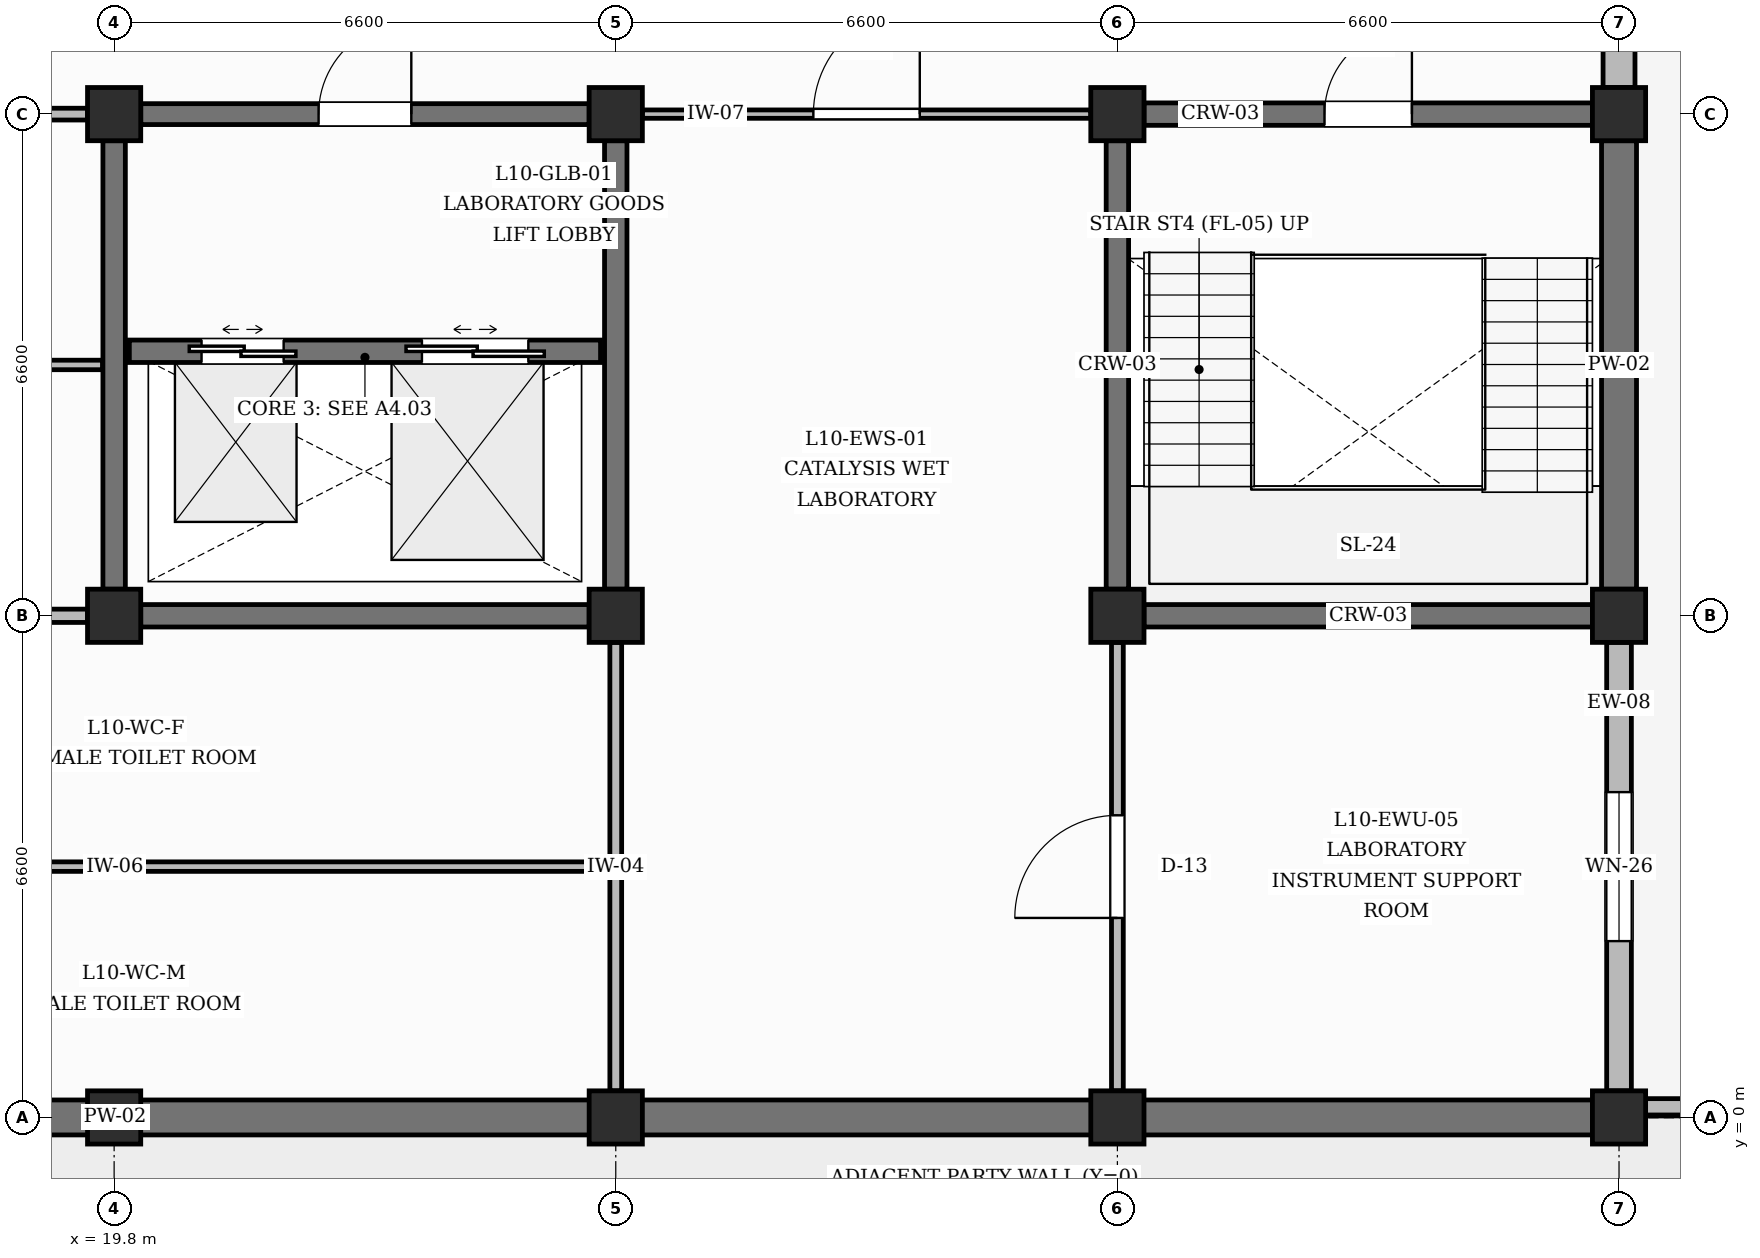
"""IFC4 building model, lengths in metres.
Left out: names, types, materials, properties, quantities, classifications, styles, units other than length and angle.
Written with IfcOpenShell. Run it as: python <this file> out.ifc"""

import sys

from ifc_helpers import new_model, si_unit, direction, frame, frame_2d, origin, origin_2d, place, context, subcontext, project, spatial, rectangle, extrude, element, fill, save


model = new_model("IFC4")
c1 = context("Model", 3, precision=1e-05, world=origin(), true_north=direction((0.0, 1.0)))
c2 = subcontext(c1, "Body", "Model", "MODEL_VIEW")
j1 = project(units=[si_unit("LENGTHUNIT", "METRE"), si_unit("PLANEANGLEUNIT", "RADIAN")], contexts=[c1])
p1 = place(None, origin())
s1 = spatial("IfcSite", under=j1, at=p1, CompositionType="ELEMENT")
p2 = place(p1, origin())
s2 = spatial("IfcBuilding", under=s1, at=p2, CompositionType="ELEMENT")
p3 = place(p2, frame((0.0, 0.0, 43.8)))
s3 = spatial("IfcBuildingStorey", under=s2, at=p3, CompositionType="ELEMENT", Elevation=43.8)
for number, where, z_axis, x_axis in (
    (1, (19.8, 0.0, 0.0), (0.0, 0.0, 1.0), (1.0, 0.0, 0.0)),
    (2, (19.8, 6.6, 0.0), (0.0, 0.0, 1.0), (1.0, 0.0, 0.0)),
    (3, (19.8, 13.2, 0.0), (0.0, 0.0, 1.0), (1.0, 0.0, 0.0)),
    (4, (26.4, 0.0, 0.0), (0.0, 0.0, 1.0), (1.0, 0.0, 0.0)),
    (5, (26.4, 6.6, 0.0), (0.0, 0.0, 1.0), (1.0, 0.0, 0.0)),
    (6, (26.4, 13.2, 0.0), (0.0, 0.0, 1.0), (1.0, 0.0, 0.0)),
    (7, (33.0, 0.0, 0.0), (0.0, 0.0, 1.0), (1.0, 0.0, 0.0)),
    (8, (33.0, 6.6, 0.0), (0.0, 0.0, 1.0), (1.0, 0.0, 0.0)),
    (9, (33.0, 13.2, 0.0), (0.0, 0.0, 1.0), (1.0, 0.0, 0.0)),
    (10, (39.6, 0.0, 0.0), (0.0, 0.0, 1.0), (1.0, 0.0, 0.0)),
    (11, (39.6, 6.6, 0.0), (0.0, 0.0, 1.0), (1.0, 0.0, 0.0)),
    (12, (39.6, 13.2, 0.0), (0.0, 0.0, 1.0), (1.0, 0.0, 0.0)),
):
    element("IfcColumn", number, at=place(p3, frame(where, z_axis=z_axis, x_axis=x_axis)), inside=s3, PredefinedType="COLUMN", context=c2, shape_type="SweptSolid", body=[
        extrude(rectangle(XDim=0.7, YDim=0.7, at=origin_2d()), origin(), (0.0, 0.0, 1.0), 4.2),
    ])
p4 = place(p3, frame((13.575, 0.0, 0.0), z_axis=(0.0, 0.0, 1.0), x_axis=(1.0, 0.0, 0.0)))
e13 = element("IfcWall", 13, at=p4, inside=s3, PredefinedType="SOLIDWALL", context=c2, shape_type="SweptSolid", body=[
    extrude(rectangle(XDim=5.875, YDim=0.46, at=frame_2d((2.938, 0.0))), origin(), (0.0, 0.0, 1.0), 3.29),
])
p5 = place(p3, frame((20.15, 0.0, 0.0), z_axis=(0.0, 0.0, 1.0), x_axis=(1.0, 0.0, 0.0)))
e14 = element("IfcWall", 14, at=p5, inside=s3, PredefinedType="SOLIDWALL", context=c2, shape_type="SweptSolid", body=[
    extrude(rectangle(XDim=5.9, YDim=0.46, at=frame_2d((2.95, 0.0))), origin(), (0.0, 0.0, 1.0), 3.29),
])
for number, where, z_axis, x_axis in (
    (15, (26.75, 0.0, 0.0), (0.0, 0.0, 1.0), (1.0, 0.0, 0.0)),
    (16, (33.35, 0.0, 0.0), (0.0, 0.0, 1.0), (1.0, 0.0, 0.0)),
):
    element("IfcWall", number, at=place(p3, frame(where, z_axis=z_axis, x_axis=x_axis)), inside=s3, PredefinedType="SOLIDWALL", context=c2, shape_type="SweptSolid", body=[
        extrude(rectangle(XDim=5.9, YDim=0.46, at=frame_2d((2.95, 0.0))), origin(), (0.0, 0.0, 1.0), 3.29),
    ])
p6 = place(p3, frame((39.6, 0.35, 0.0), z_axis=(0.0, 0.0, 1.0), x_axis=(0.0, 1.0, 0.0)))
e17 = element("IfcWall", 17, at=p6, inside=s3, PredefinedType="SOLIDWALL", context=c2, shape_type="SweptSolid", body=[
    extrude(rectangle(XDim=5.9, YDim=0.325, at=frame_2d((2.95, 0.0))), origin(), (0.0, 0.0, 1.0), 3.29),
])
p7 = place(p6, frame((1.97, 0.0, 0.95)))
e18 = element("IfcOpeningElement", 18, at=p7, cuts=e17, PredefinedType="OPENING", context=c2, shape_type="SweptSolid", body=[
    extrude(rectangle(XDim=1.96, YDim=1.52, at=frame_2d((0.98, 0.76))), frame((0.0, 0.172, 0.0), z_axis=(0.0, -1.0, 0.0), x_axis=(1.0, 0.0, 0.0)), (0.0, 0.0, 1.0), 0.345),
])
p8 = place(p3, frame((39.6, 6.95, 0.0), z_axis=(0.0, 0.0, 1.0), x_axis=(0.0, 1.0, 0.0)))
e19 = element("IfcWall", 19, at=p8, inside=s3, PredefinedType="SOLIDWALL", context=c2, shape_type="SweptSolid", body=[
    extrude(rectangle(XDim=5.9, YDim=0.46, at=frame_2d((2.95, 0.0))), origin(), (0.0, 0.0, 1.0), 3.29),
])
p9 = place(p3, frame((39.6, 13.55, 0.0), z_axis=(0.0, 0.0, 1.0), x_axis=(0.0, 1.0, 0.0)))
e20 = element("IfcWall", 20, at=p9, inside=s3, PredefinedType="SOLIDWALL", context=c2, shape_type="SweptSolid", body=[
    extrude(rectangle(XDim=5.9, YDim=0.42, at=frame_2d((2.95, 0.0))), origin(), (0.0, 0.0, 1.0), 3.29),
])
p10 = place(p9, frame((1.97, 0.0, 0.95)))
e21 = element("IfcOpeningElement", 21, at=p10, cuts=e20, PredefinedType="OPENING", context=c2, shape_type="SweptSolid", body=[
    extrude(rectangle(XDim=1.96, YDim=1.74, at=frame_2d((0.98, 0.87))), frame((0.0, 0.22, 0.0), z_axis=(0.0, -1.0, 0.0), x_axis=(1.0, 0.0, 0.0)), (0.0, 0.0, 1.0), 0.44),
])
p11 = place(p3, frame((39.74, 0.14, 0.0), z_axis=(0.0, 0.0, 1.0), x_axis=(1.0, 0.0, 0.0)))
e22 = element("IfcWall", 22, at=p11, inside=s3, PredefinedType="PARAPET", context=c2, shape_type="SweptSolid", body=[
    extrude(rectangle(XDim=6.32, YDim=0.215, at=frame_2d((3.16, 0.0))), origin(), (0.0, 0.0, 1.0), 1.15),
])
p12 = place(p3, frame((33.35, 6.6, 0.0), z_axis=(0.0, 0.0, 1.0), x_axis=(1.0, 0.0, 0.0)))
e23 = element("IfcWall", 23, at=p12, inside=s3, PredefinedType="SHEAR", context=c2, shape_type="SweptSolid", body=[
    extrude(rectangle(XDim=5.9, YDim=0.295, at=frame_2d((2.95, 0.0))), origin(), (0.0, 0.0, 1.0), 3.29),
])
p13 = place(p3, frame((33.35, 13.2, 0.0), z_axis=(0.0, 0.0, 1.0), x_axis=(1.0, 0.0, 0.0)))
e24 = element("IfcWall", 24, at=p13, inside=s3, PredefinedType="SHEAR", context=c2, shape_type="SweptSolid", body=[
    extrude(rectangle(XDim=5.9, YDim=0.295, at=frame_2d((2.95, 0.0))), origin(), (0.0, 0.0, 1.0), 3.29),
])
p14 = place(p13, frame((2.375, 0.0, 0.0)))
e25 = element("IfcOpeningElement", 25, at=p14, cuts=e24, PredefinedType="OPENING", context=c2, shape_type="SweptSolid", body=[
    extrude(rectangle(XDim=1.15, YDim=2.2, at=frame_2d((0.575, 1.1))), frame((0.0, 0.157, 0.0), z_axis=(0.0, -1.0, 0.0), x_axis=(1.0, 0.0, 0.0)), (0.0, 0.0, 1.0), 0.315),
])
for number, where, z_axis, x_axis in (
    (26, (33.0, 6.95, 0.0), (0.0, 0.0, 1.0), (0.0, 1.0, 0.0)),
    (27, (20.15, 6.6, 0.0), (0.0, 0.0, 1.0), (1.0, 0.0, 0.0)),
    (28, (19.8, 6.95, 0.0), (0.0, 0.0, 1.0), (0.0, 1.0, 0.0)),
    (29, (26.4, 6.95, 0.0), (0.0, 0.0, 1.0), (0.0, 1.0, 0.0)),
):
    element("IfcWall", number, at=place(p3, frame(where, z_axis=z_axis, x_axis=x_axis)), inside=s3, PredefinedType="SHEAR", context=c2, shape_type="SweptSolid", body=[
        extrude(rectangle(XDim=5.9, YDim=0.295, at=frame_2d((2.95, 0.0))), origin(), (0.0, 0.0, 1.0), 3.29),
    ])
p15 = place(p3, frame((20.15, 13.2, 0.0), z_axis=(0.0, 0.0, 1.0), x_axis=(1.0, 0.0, 0.0)))
e30 = element("IfcWall", 30, at=p15, inside=s3, PredefinedType="SHEAR", context=c2, shape_type="SweptSolid", body=[
    extrude(rectangle(XDim=5.9, YDim=0.275, at=frame_2d((2.95, 0.0))), origin(), (0.0, 0.0, 1.0), 3.29),
])
p16 = place(p15, frame((2.34, 0.0, 0.0)))
e31 = element("IfcOpeningElement", 31, at=p16, cuts=e30, PredefinedType="OPENING", context=c2, shape_type="SweptSolid", body=[
    extrude(rectangle(XDim=1.22, YDim=2.15, at=frame_2d((0.61, 1.075))), frame((0.0, 0.147, 0.0), z_axis=(0.0, -1.0, 0.0), x_axis=(1.0, 0.0, 0.0)), (0.0, 0.0, 1.0), 0.295),
])
p17 = place(p3, frame((20.0, 10.08, 0.0), z_axis=(0.0, 0.0, 1.0), x_axis=(1.0, 0.0, 0.0)))
e32 = element("IfcWall", 32, at=p17, inside=s3, PredefinedType="SHEAR", context=c2, shape_type="SweptSolid", body=[
    extrude(rectangle(XDim=6.2, YDim=0.295, at=frame_2d((3.1, 0.0))), origin(), (0.0, 0.0, 1.0), 3.89),
])
p18 = place(p17, frame((0.95, 0.0, 0.0)))
e33 = element("IfcOpeningElement", 33, at=p18, cuts=e32, PredefinedType="OPENING", context=c2, shape_type="SweptSolid", body=[
    extrude(rectangle(XDim=1.08, YDim=2.15, at=frame_2d((0.54, 1.075))), frame((0.0, 0.157, 0.0), z_axis=(0.0, -1.0, 0.0), x_axis=(1.0, 0.0, 0.0)), (0.0, 0.0, 1.0), 0.315),
])
p19 = place(p17, frame((3.85, 0.0, 0.0)))
e34 = element("IfcOpeningElement", 34, at=p19, cuts=e32, PredefinedType="OPENING", context=c2, shape_type="SweptSolid", body=[
    extrude(rectangle(XDim=1.4, YDim=2.35, at=frame_2d((0.7, 1.175))), frame((0.0, 0.157, 0.0), z_axis=(0.0, -1.0, 0.0), x_axis=(1.0, 0.0, 0.0)), (0.0, 0.0, 1.0), 0.315),
])
p20 = place(p3, frame((26.4, 0.35, 0.0), z_axis=(0.0, 0.0, 1.0), x_axis=(0.0, 1.0, 0.0)))
e35 = element("IfcWall", 35, at=p20, inside=s3, PredefinedType="PARTITIONING", context=c2, shape_type="SweptSolid", body=[
    extrude(rectangle(XDim=5.9, YDim=0.155, at=frame_2d((2.95, 0.0))), origin(), (0.0, 0.0, 1.0), 3.29),
])
p21 = place(p3, frame((13.575, 6.6, 0.0), z_axis=(0.0, 0.0, 1.0), x_axis=(1.0, 0.0, 0.0)))
e36 = element("IfcWall", 36, at=p21, inside=s3, PredefinedType="PARTITIONING", context=c2, shape_type="SweptSolid", body=[
    extrude(rectangle(XDim=5.875, YDim=0.175, at=frame_2d((2.938, 0.0))), origin(), (0.0, 0.0, 1.0), 3.29),
])
p22 = place(p3, frame((13.575, 13.2, 0.0), z_axis=(0.0, 0.0, 1.0), x_axis=(1.0, 0.0, 0.0)))
e37 = element("IfcWall", 37, at=p22, inside=s3, PredefinedType="PARTITIONING", context=c2, shape_type="SweptSolid", body=[
    extrude(rectangle(XDim=5.875, YDim=0.155, at=frame_2d((2.938, 0.0))), origin(), (0.0, 0.0, 1.0), 3.29),
])
p23 = place(p3, frame((33.0, 0.35, 0.0), z_axis=(0.0, 0.0, 1.0), x_axis=(0.0, 1.0, 0.0)))
e38 = element("IfcWall", 38, at=p23, inside=s3, PredefinedType="PARTITIONING", context=c2, shape_type="SweptSolid", body=[
    extrude(rectangle(XDim=5.9, YDim=0.155, at=frame_2d((2.95, 0.0))), origin(), (0.0, 0.0, 1.0), 3.29),
])
p24 = place(p23, frame((2.275, 0.0, 0.0)))
e39 = element("IfcOpeningElement", 39, at=p24, cuts=e38, PredefinedType="OPENING", context=c2, shape_type="SweptSolid", body=[
    extrude(rectangle(XDim=1.35, YDim=2.3, at=frame_2d((0.675, 1.15))), frame((0.0, 0.087, 0.0), z_axis=(0.0, -1.0, 0.0), x_axis=(1.0, 0.0, 0.0)), (0.0, 0.0, 1.0), 0.175),
])
p25 = place(p3, frame((26.75, 13.2, 0.0), z_axis=(0.0, 0.0, 1.0), x_axis=(1.0, 0.0, 0.0)))
e40 = element("IfcWall", 40, at=p25, inside=s3, PredefinedType="PARTITIONING", context=c2, shape_type="SweptSolid", body=[
    extrude(rectangle(XDim=5.9, YDim=0.11, at=frame_2d((2.95, 0.0))), origin(), (0.0, 0.0, 1.0), 3.29),
])
p26 = place(p25, frame((2.25, 0.0, 0.0)))
e41 = element("IfcOpeningElement", 41, at=p26, cuts=e40, PredefinedType="OPENING", context=c2, shape_type="SweptSolid", body=[
    extrude(rectangle(XDim=1.4, YDim=2.25, at=frame_2d((0.7, 1.125))), frame((0.0, 0.065, 0.0), z_axis=(0.0, -1.0, 0.0), x_axis=(1.0, 0.0, 0.0)), (0.0, 0.0, 1.0), 0.13),
])
p27 = place(p3, frame((13.302, 3.3, 0.0), z_axis=(0.0, 0.0, 1.0), x_axis=(1.0, 0.0, 0.0)))
e42 = element("IfcWall", 42, at=p27, inside=s3, PredefinedType="PARTITIONING", context=c2, shape_type="SweptSolid", body=[
    extrude(rectangle(XDim=13.015, YDim=0.125, at=frame_2d((6.507, 0.0))), origin(), (0.0, 0.0, 1.0), 3.89),
])
p28 = place(p3, frame((13.292, 9.9, 0.0), z_axis=(0.0, 0.0, 1.0), x_axis=(1.0, 0.0, 0.0)))
e43 = element("IfcWall", 43, at=p28, inside=s3, PredefinedType="PARTITIONING", context=c2, shape_type="SweptSolid", body=[
    extrude(rectangle(XDim=6.355, YDim=0.125, at=frame_2d((3.177, 0.0))), origin(), (0.0, 0.0, 1.0), 3.89),
])
p29 = place(p7, origin())
e44 = element("IfcWindow", 44, at=p29, inside=s3, PartitioningType="DOUBLE_PANEL_VERTICAL", PredefinedType="WINDOW", context=c2, shape_type="SweptSolid", body=[
    extrude(rectangle(XDim=1.96, YDim=1.52, at=frame_2d((0.98, 0.76))), frame((0.0, 0.03, 0.0), z_axis=(0.0, -1.0, 0.0), x_axis=(1.0, 0.0, 0.0)), (0.0, 0.0, 1.0), 0.06),
])
fill(e18, e44)
p30 = place(p14, origin())
e45 = element("IfcDoor", 45, at=p30, inside=s3, OperationType="SINGLE_SWING_RIGHT", PredefinedType="DOOR", context=c2, shape_type="SweptSolid", body=[
    extrude(rectangle(XDim=1.15, YDim=2.2, at=frame_2d((0.575, 1.1))), frame((0.0, 0.025, 0.0), z_axis=(0.0, -1.0, 0.0), x_axis=(1.0, 0.0, 0.0)), (0.0, 0.0, 1.0), 0.05),
])
fill(e25, e45)
p31 = place(p18, origin())
e46 = element("IfcDoor", 46, at=p31, inside=s3, OperationType="DOUBLE_DOOR_SLIDING", PredefinedType="USERDEFINED", context=c2, shape_type="SweptSolid", body=[
    extrude(rectangle(XDim=1.08, YDim=2.15, at=frame_2d((0.54, 1.075))), frame((0.0, 0.025, 0.0), z_axis=(0.0, -1.0, 0.0), x_axis=(1.0, 0.0, 0.0)), (0.0, 0.0, 1.0), 0.05),
])
fill(e33, e46)
p32 = place(p19, origin())
e47 = element("IfcDoor", 47, at=p32, inside=s3, OperationType="DOUBLE_DOOR_SLIDING", PredefinedType="USERDEFINED", context=c2, shape_type="SweptSolid", body=[
    extrude(rectangle(XDim=1.4, YDim=2.35, at=frame_2d((0.7, 1.175))), frame((0.0, 0.025, 0.0), z_axis=(0.0, -1.0, 0.0), x_axis=(1.0, 0.0, 0.0)), (0.0, 0.0, 1.0), 0.05),
])
fill(e34, e47)
p33 = place(p16, origin())
e48 = element("IfcDoor", 48, at=p33, inside=s3, OperationType="SINGLE_SWING_RIGHT", PredefinedType="DOOR", context=c2, shape_type="SweptSolid", body=[
    extrude(rectangle(XDim=1.22, YDim=2.15, at=frame_2d((0.61, 1.075))), frame((0.0, 0.025, 0.0), z_axis=(0.0, -1.0, 0.0), x_axis=(1.0, 0.0, 0.0)), (0.0, 0.0, 1.0), 0.05),
])
fill(e31, e48)
p34 = place(p26, origin())
e49 = element("IfcDoor", 49, at=p34, inside=s3, OperationType="SINGLE_SWING_RIGHT", PredefinedType="DOOR", context=c2, shape_type="SweptSolid", body=[
    extrude(rectangle(XDim=1.4, YDim=2.25, at=frame_2d((0.7, 1.125))), frame((0.0, 0.025, 0.0), z_axis=(0.0, -1.0, 0.0), x_axis=(1.0, 0.0, 0.0)), (0.0, 0.0, 1.0), 0.05),
])
fill(e41, e49)
p35 = place(p24, origin())
e50 = element("IfcDoor", 50, at=p35, inside=s3, OperationType="SINGLE_SWING_LEFT", PredefinedType="DOOR", context=c2, shape_type="SweptSolid", body=[
    extrude(rectangle(XDim=1.35, YDim=2.3, at=frame_2d((0.675, 1.15))), frame((0.0, 0.025, 0.0), z_axis=(0.0, -1.0, 0.0), x_axis=(1.0, 0.0, 0.0)), (0.0, 0.0, 1.0), 0.05),
])
fill(e39, e50)
save(model, sys.argv[1])
